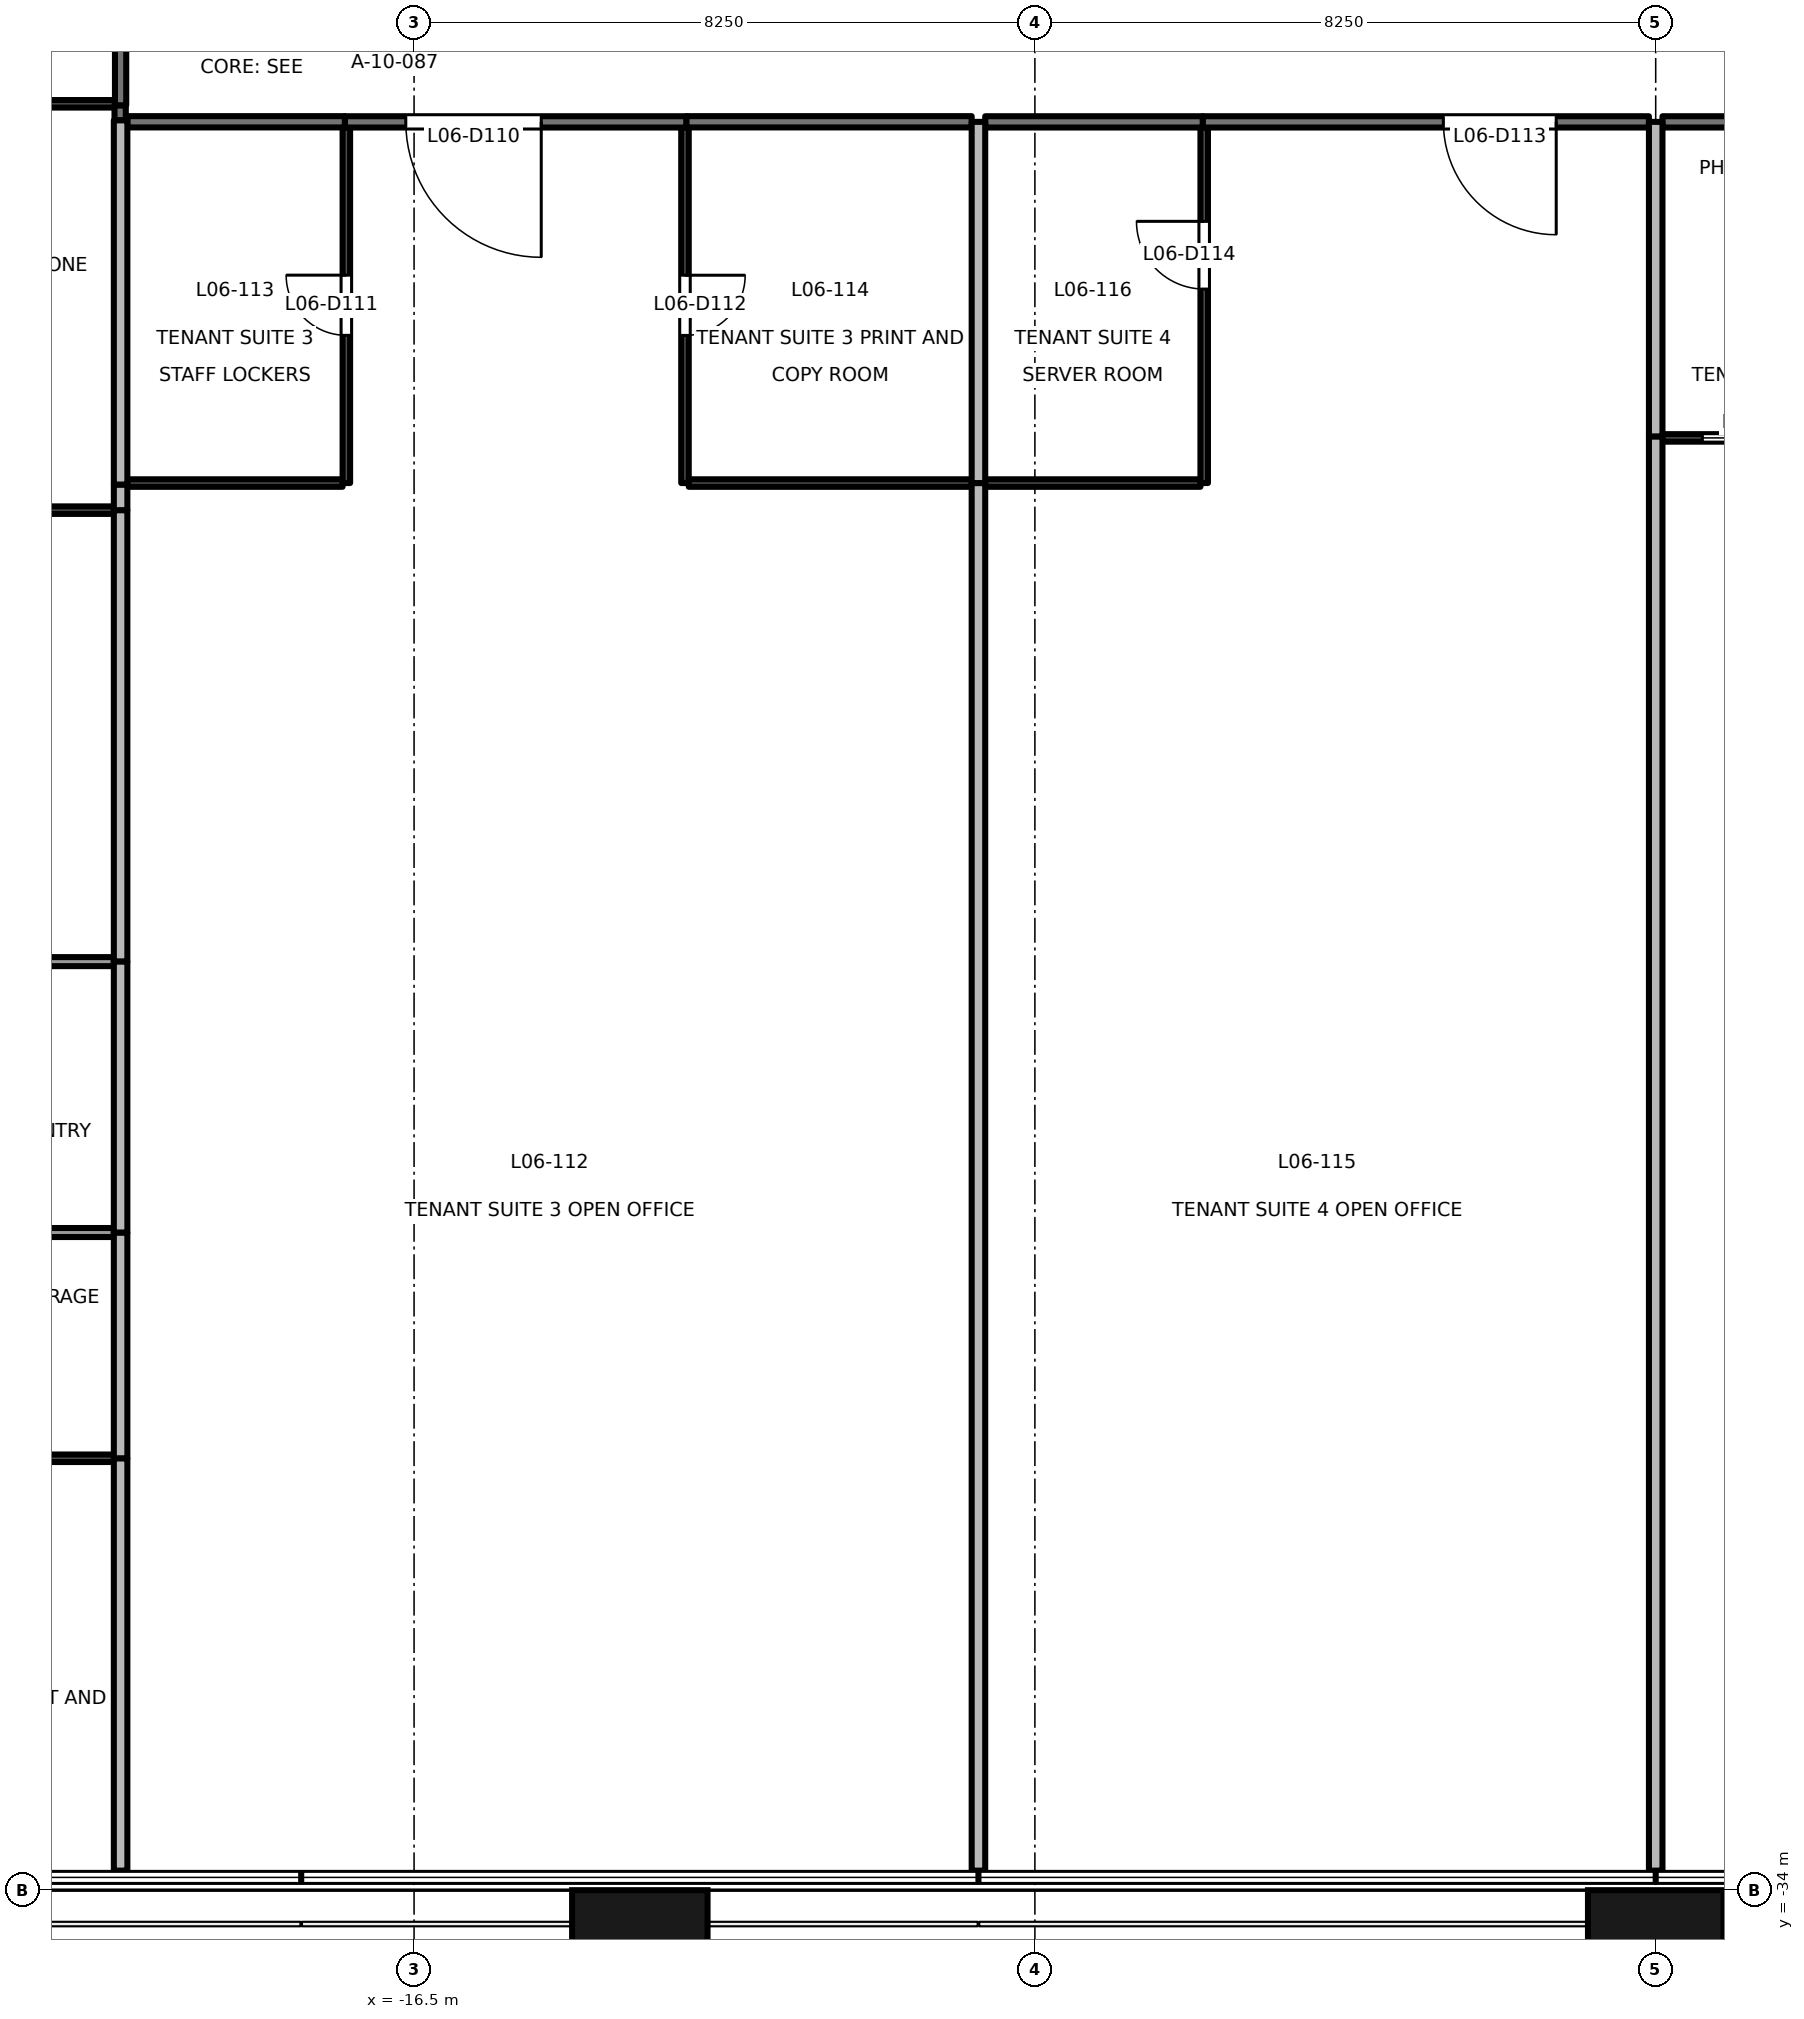
"""IFC4 building model, lengths in metres.
Left out: names, types, materials, properties, quantities, classifications, styles, units other than length and angle.
Written with IfcOpenShell. Run it as: python <this file> out.ifc"""

import sys

from ifc_helpers import new_model, si_unit, direction, frame, frame_2d, origin, origin_2d, place, context, subcontext, project, spatial, rectangle, extrude, element, fill, save


model = new_model("IFC4")
c1 = context("Model", 3, precision=1e-05, world=origin(), true_north=direction((0.0, 1.0)))
c2 = subcontext(c1, "Body", "Model", "MODEL_VIEW")
j1 = project(units=[si_unit("LENGTHUNIT", "METRE"), si_unit("PLANEANGLEUNIT", "RADIAN")], contexts=[c1])
p1 = place(None, origin())
s1 = spatial("IfcSite", under=j1, at=p1, CompositionType="ELEMENT")
p2 = place(p1, origin())
s2 = spatial("IfcBuilding", under=s1, at=p2, CompositionType="ELEMENT")
p3 = place(p2, frame((0.0, 0.0, 32.4)))
s3 = spatial("IfcBuildingStorey", under=s2, at=p3, CompositionType="ELEMENT", Elevation=32.4)
for number, where, z_axis, x_axis in (
    (1, (-13.5, -34.9, -0.2), (0.0, 0.0, 1.0), (1.0, 0.0, 0.0)),
    (2, (0.0, -34.9, -0.2), (0.0, 0.0, 1.0), (1.0, 0.0, 0.0)),
):
    element("IfcColumn", number, at=place(p3, frame(where, z_axis=z_axis, x_axis=x_axis)), inside=s3, PredefinedType="COLUMN", context=c2, shape_type="SweptSolid", body=[
        extrude(rectangle(XDim=1.8, YDim=1.8, at=origin_2d()), origin(), (0.0, 0.0, 1.0), 4.1),
    ])
p4 = place(p3, frame((-20.406, -10.48, 0.0), z_axis=(0.0, 0.0, 1.0), x_axis=(0.0, 1.0, 0.0)))
e3 = element("IfcWall", 3, at=p4, inside=s3, PredefinedType="PARTITIONING", context=c2, shape_type="SweptSolid", body=[
    extrude(rectangle(XDim=0.2, YDim=0.15, at=frame_2d((0.1, 0.0))), origin(), (0.0, 0.0, 1.0), 3.9),
])
p5 = place(p3, frame((-20.4, -10.28, 0.0), z_axis=(0.0, 0.0, 1.0), x_axis=(0.0, 1.0, 0.0)))
e4 = element("IfcWall", 4, at=p5, inside=s3, PredefinedType="PARTITIONING", context=c2, shape_type="SweptSolid", body=[
    extrude(rectangle(XDim=4.2, YDim=0.15, at=frame_2d((2.1, 0.0))), origin(), (0.0, 0.0, 1.0), 3.3),
])
p6 = place(p3, frame((-12.88, -10.5, 0.0), z_axis=(0.0, 0.0, 1.0), x_axis=(-1.0, 0.0, 0.0)))
e5 = element("IfcWall", 5, at=p6, inside=s3, PredefinedType="PARTITIONING", context=c2, shape_type="SweptSolid", body=[
    extrude(rectangle(XDim=4.54, YDim=0.15, at=frame_2d((2.27, 0.0))), origin(), (0.0, 0.0, 1.0), 2.9),
])
p7 = place(p6, frame((1.93, 0.0, 0.0)))
e6 = element("IfcOpeningElement", 6, at=p7, cuts=e5, PredefinedType="OPENING", context=c2, shape_type="SweptSolid", body=[
    extrude(rectangle(XDim=1.8, YDim=2.1, at=frame_2d((0.9, 1.05))), frame((0.0, 0.085, 0.0), z_axis=(0.0, -1.0, 0.0), x_axis=(1.0, 0.0, 0.0)), (0.0, 0.0, 1.0), 0.171),
])
p8 = place(p3, frame((-17.42, -10.499, 0.0), z_axis=(0.0, 0.0, 1.0), x_axis=(-1.0, 0.0, 0.0)))
e7 = element("IfcWall", 7, at=p8, inside=s3, PredefinedType="PARTITIONING", context=c2, shape_type="SweptSolid", body=[
    extrude(rectangle(XDim=2.89, YDim=0.15, at=frame_2d((1.445, 0.0))), origin(), (0.0, 0.0, 1.0), 2.5),
])
p9 = place(p3, frame((-9.09, -10.499, 0.0), z_axis=(0.0, 0.0, 1.0), x_axis=(-1.0, 0.0, 0.0)))
e8 = element("IfcWall", 8, at=p9, inside=s3, PredefinedType="PARTITIONING", context=c2, shape_type="SweptSolid", body=[
    extrude(rectangle(XDim=3.79, YDim=0.15, at=frame_2d((1.895, 0.0))), origin(), (0.0, 0.0, 1.0), 2.9),
])
p10 = place(p3, frame((-0.09, -10.5, 0.0), z_axis=(0.0, 0.0, 1.0), x_axis=(-1.0, 0.0, 0.0)))
e9 = element("IfcWall", 9, at=p10, inside=s3, PredefinedType="PARTITIONING", context=c2, shape_type="SweptSolid", body=[
    extrude(rectangle(XDim=5.93, YDim=0.15, at=frame_2d((2.965, 0.0))), origin(), (0.0, 0.0, 1.0), 2.9),
])
p11 = place(p10, frame((1.232, 0.0, 0.0)))
e10 = element("IfcOpeningElement", 10, at=p11, cuts=e9, PredefinedType="OPENING", context=c2, shape_type="SweptSolid", body=[
    extrude(rectangle(XDim=1.5, YDim=2.1, at=frame_2d((0.75, 1.05))), frame((0.0, 0.085, 0.0), z_axis=(0.0, -1.0, 0.0), x_axis=(1.0, 0.0, 0.0)), (0.0, 0.0, 1.0), 0.171),
])
for number, where, z_axis, x_axis in (
    (11, (-6.02, -10.5, 0.0), (0.0, 0.0, 1.0), (-1.0, 0.0, 0.0)),
    (12, (2.98, -10.5, 0.0), (0.0, 0.0, 1.0), (-1.0, 0.0, 0.0)),
):
    element("IfcWall", number, at=place(p3, frame(where, z_axis=z_axis, x_axis=x_axis)), inside=s3, PredefinedType="PARTITIONING", context=c2, shape_type="SweptSolid", body=[
        extrude(rectangle(XDim=2.89, YDim=0.15, at=frame_2d((1.445, 0.0))), origin(), (0.0, 0.0, 1.0), 2.9),
    ])
p12 = place(p3, frame((-20.49, -21.66, 0.0), z_axis=(0.0, 0.0, 1.0), x_axis=(-1.0, 0.0, 0.0)))
e13 = element("IfcWall", 13, at=p12, inside=s3, PredefinedType="PARTITIONING", context=c2, shape_type="SweptSolid", body=[
    extrude(rectangle(XDim=3.81, YDim=0.12, at=frame_2d((1.905, 0.0))), origin(), (0.0, 0.0, 1.0), 3.9),
])
p13 = place(p12, frame((1.937, 0.0, 0.0)))
e14 = element("IfcOpeningElement", 14, at=p13, cuts=e13, PredefinedType="OPENING", context=c2, shape_type="SweptSolid", body=[
    extrude(rectangle(XDim=0.9, YDim=2.1, at=frame_2d((0.45, 1.05))), frame((0.0, 0.071, 0.0), z_axis=(0.0, -1.0, 0.0), x_axis=(1.0, 0.0, 0.0)), (0.0, 0.0, 1.0), 0.141),
])
p14 = place(p3, frame((-24.25, -15.66, 0.0), z_axis=(0.0, 0.0, 1.0), x_axis=(1.0, 0.0, 0.0)))
e15 = element("IfcWall", 15, at=p14, inside=s3, PredefinedType="PARTITIONING", context=c2, shape_type="SweptSolid", body=[
    extrude(rectangle(XDim=3.76, YDim=0.1, at=frame_2d((1.88, 0.0))), origin(), (0.0, 0.0, 1.0), 3.9),
])
p15 = place(p14, frame((0.98, 0.0, 0.9)))
e16 = element("IfcOpeningElement", 16, at=p15, cuts=e15, PredefinedType="OPENING", context=c2, shape_type="SweptSolid", body=[
    extrude(rectangle(XDim=1.8, YDim=1.2, at=frame_2d((0.9, 0.6))), frame((0.0, 0.061, 0.0), z_axis=(0.0, -1.0, 0.0), x_axis=(1.0, 0.0, 0.0)), (0.0, 0.0, 1.0), 0.121),
])
p16 = place(p3, frame((-20.4, -15.66, 0.0), z_axis=(0.0, 0.0, 1.0), x_axis=(0.0, -1.0, 0.0)))
e17 = element("IfcWall", 17, at=p16, inside=s3, PredefinedType="PARTITIONING", context=c2, shape_type="SweptSolid", body=[
    extrude(rectangle(XDim=6.0, YDim=0.18, at=frame_2d((3.0, 0.0))), origin(), (0.0, 0.0, 1.0), 3.3),
])
p17 = place(p3, frame((-24.25, -28.26, 0.0), z_axis=(0.0, 0.0, 1.0), x_axis=(1.0, 0.0, 0.0)))
e18 = element("IfcWall", 18, at=p17, inside=s3, PredefinedType="PARTITIONING", context=c2, shape_type="SweptSolid", body=[
    extrude(rectangle(XDim=3.76, YDim=0.1, at=frame_2d((1.88, 0.0))), origin(), (0.0, 0.0, 1.0), 3.9),
])
p18 = place(p3, frame((-20.4, -28.26, 0.0), z_axis=(0.0, 0.0, 1.0), x_axis=(0.0, -1.0, 0.0)))
e19 = element("IfcWall", 19, at=p18, inside=s3, PredefinedType="PARTITIONING", context=c2, shape_type="SweptSolid", body=[
    extrude(rectangle(XDim=5.48, YDim=0.18, at=frame_2d((2.74, 0.0))), origin(), (0.0, 0.0, 1.0), 3.9),
])
p19 = place(p3, frame((-24.3, -25.26, 0.0), z_axis=(0.0, 0.0, 1.0), x_axis=(1.0, 0.0, 0.0)))
e20 = element("IfcWall", 20, at=p19, inside=s3, PredefinedType="PARTITIONING", context=c2, shape_type="SweptSolid", body=[
    extrude(rectangle(XDim=3.81, YDim=0.12, at=frame_2d((1.905, 0.0))), origin(), (0.0, 0.0, 1.0), 3.9),
])
p20 = place(p3, frame((-20.4, -25.26, 0.0), z_axis=(0.0, 0.0, 1.0), x_axis=(0.0, -1.0, 0.0)))
e21 = element("IfcWall", 21, at=p20, inside=s3, PredefinedType="PARTITIONING", context=c2, shape_type="SweptSolid", body=[
    extrude(rectangle(XDim=3.0, YDim=0.18, at=frame_2d((1.5, 0.0))), origin(), (0.0, 0.0, 1.0), 3.3),
])
p21 = place(p3, frame((-20.4, -21.66, 0.0), z_axis=(0.0, 0.0, 1.0), x_axis=(0.0, -1.0, 0.0)))
e22 = element("IfcWall", 22, at=p21, inside=s3, PredefinedType="PARTITIONING", context=c2, shape_type="SweptSolid", body=[
    extrude(rectangle(XDim=3.6, YDim=0.18, at=frame_2d((1.8, 0.0))), origin(), (0.0, 0.0, 1.0), 3.3),
])
p22 = place(p3, frame((-24.25, -10.26, 0.0), z_axis=(0.0, 0.0, 1.0), x_axis=(1.0, 0.0, 0.0)))
e23 = element("IfcWall", 23, at=p22, inside=s3, PredefinedType="PARTITIONING", context=c2, shape_type="SweptSolid", body=[
    extrude(rectangle(XDim=3.775, YDim=0.1, at=frame_2d((1.887, 0.0))), origin(), (0.0, 0.0, 1.0), 3.9),
])
p23 = place(p3, frame((-20.4, -15.32, 0.0), z_axis=(0.0, 0.0, 1.0), x_axis=(0.0, -1.0, 0.0)))
e24 = element("IfcWall", 24, at=p23, inside=s3, PredefinedType="PARTITIONING", context=c2, shape_type="SweptSolid", body=[
    extrude(rectangle(XDim=0.34, YDim=0.18, at=frame_2d((0.17, 0.0))), origin(), (0.0, 0.0, 1.0), 3.9),
])
p24 = place(p3, frame((-20.4, -10.48, 0.0), z_axis=(0.0, 0.0, 1.0), x_axis=(0.0, -1.0, 0.0)))
e25 = element("IfcWall", 25, at=p24, inside=s3, PredefinedType="PARTITIONING", context=c2, shape_type="SweptSolid", body=[
    extrude(rectangle(XDim=4.84, YDim=0.18, at=frame_2d((2.42, 0.0))), origin(), (0.0, 0.0, 1.0), 3.3),
])
p25 = place(p3, frame((-20.31, -15.3, 0.0), z_axis=(0.0, 0.0, 1.0), x_axis=(1.0, 0.0, 0.0)))
e26 = element("IfcWall", 26, at=p25, inside=s3, PredefinedType="PARTITIONING", context=c2, shape_type="SweptSolid", body=[
    extrude(rectangle(XDim=2.86, YDim=0.1, at=frame_2d((1.43, 0.0))), origin(), (0.0, 0.0, 1.0), 2.5),
])
p26 = place(p3, frame((-17.4, -15.3, 0.0), z_axis=(0.0, 0.0, 1.0), x_axis=(0.0, 1.0, 0.0)))
e27 = element("IfcWall", 27, at=p26, inside=s3, PredefinedType="PARTITIONING", context=c2, shape_type="SweptSolid", body=[
    extrude(rectangle(XDim=4.725, YDim=0.1, at=frame_2d((2.363, 0.0))), origin(), (0.0, 0.0, 1.0), 3.9),
])
p27 = place(p26, frame((1.963, 0.0, 0.0)))
e28 = element("IfcOpeningElement", 28, at=p27, cuts=e27, PredefinedType="OPENING", context=c2, shape_type="SweptSolid", body=[
    extrude(rectangle(XDim=0.8, YDim=2.1, at=frame_2d((0.4, 1.05))), frame((0.0, 0.061, 0.0), z_axis=(0.0, -1.0, 0.0), x_axis=(1.0, 0.0, 0.0)), (0.0, 0.0, 1.0), 0.121),
])
p28 = place(p3, frame((-12.9, -10.575, 0.0), z_axis=(0.0, 0.0, 1.0), x_axis=(0.0, -1.0, 0.0)))
e29 = element("IfcWall", 29, at=p28, inside=s3, PredefinedType="PARTITIONING", context=c2, shape_type="SweptSolid", body=[
    extrude(rectangle(XDim=4.725, YDim=0.1, at=frame_2d((2.363, 0.0))), origin(), (0.0, 0.0, 1.0), 3.9),
])
p29 = place(p28, frame((1.963, 0.0, 0.0)))
e30 = element("IfcOpeningElement", 30, at=p29, cuts=e29, PredefinedType="OPENING", context=c2, shape_type="SweptSolid", body=[
    extrude(rectangle(XDim=0.8, YDim=2.1, at=frame_2d((0.4, 1.05))), frame((0.0, 0.061, 0.0), z_axis=(0.0, -1.0, 0.0), x_axis=(1.0, 0.0, 0.0)), (0.0, 0.0, 1.0), 0.121),
])
p30 = place(p3, frame((-12.85, -15.3, 0.0), z_axis=(0.0, 0.0, 1.0), x_axis=(1.0, 0.0, 0.0)))
e31 = element("IfcWall", 31, at=p30, inside=s3, PredefinedType="PARTITIONING", context=c2, shape_type="SweptSolid", body=[
    extrude(rectangle(XDim=3.76, YDim=0.1, at=frame_2d((1.88, 0.0))), origin(), (0.0, 0.0, 1.0), 2.9),
])
p31 = place(p3, frame((-9.0, -15.3, 0.0), z_axis=(0.0, 0.0, 1.0), x_axis=(0.0, -1.0, 0.0)))
e32 = element("IfcWall", 32, at=p31, inside=s3, PredefinedType="PARTITIONING", context=c2, shape_type="SweptSolid", body=[
    extrude(rectangle(XDim=18.44, YDim=0.18, at=frame_2d((9.22, 0.0))), origin(), (0.0, 0.0, 1.0), 2.9),
])
p32 = place(p3, frame((-9.0, -10.5, 0.0), z_axis=(0.0, 0.0, 1.0), x_axis=(0.0, -1.0, 0.0)))
e33 = element("IfcWall", 33, at=p32, inside=s3, PredefinedType="PARTITIONING", context=c2, shape_type="SweptSolid", body=[
    extrude(rectangle(XDim=4.8, YDim=0.18, at=frame_2d((2.4, 0.0))), origin(), (0.0, 0.0, 1.0), 2.9),
])
p33 = place(p3, frame((-8.91, -15.3, 0.0), z_axis=(0.0, 0.0, 1.0), x_axis=(1.0, 0.0, 0.0)))
e34 = element("IfcWall", 34, at=p33, inside=s3, PredefinedType="PARTITIONING", context=c2, shape_type="SweptSolid", body=[
    extrude(rectangle(XDim=2.86, YDim=0.1, at=frame_2d((1.43, 0.0))), origin(), (0.0, 0.0, 1.0), 2.9),
])
p34 = place(p3, frame((-6.0, -15.3, 0.0), z_axis=(0.0, 0.0, 1.0), x_axis=(0.0, 1.0, 0.0)))
e35 = element("IfcWall", 35, at=p34, inside=s3, PredefinedType="PARTITIONING", context=c2, shape_type="SweptSolid", body=[
    extrude(rectangle(XDim=4.725, YDim=0.1, at=frame_2d((2.363, 0.0))), origin(), (0.0, 0.0, 1.0), 3.9),
])
p35 = place(p34, frame((2.578, 0.0, 0.0)))
e36 = element("IfcOpeningElement", 36, at=p35, cuts=e35, PredefinedType="OPENING", context=c2, shape_type="SweptSolid", body=[
    extrude(rectangle(XDim=0.9, YDim=2.1, at=frame_2d((0.45, 1.05))), frame((0.0, 0.061, 0.0), z_axis=(0.0, -1.0, 0.0), x_axis=(1.0, 0.0, 0.0)), (0.0, 0.0, 1.0), 0.121),
])
p36 = place(p3, frame((0.0, -14.68, 0.0), z_axis=(0.0, 0.0, 1.0), x_axis=(0.0, -1.0, 0.0)))
e37 = element("IfcWall", 37, at=p36, inside=s3, PredefinedType="PARTITIONING", context=c2, shape_type="SweptSolid", body=[
    extrude(rectangle(XDim=19.06, YDim=0.18, at=frame_2d((9.53, 0.0))), origin(), (0.0, 0.0, 1.0), 2.9),
])
p37 = place(p3, frame((0.0, -10.5, 0.0), z_axis=(0.0, 0.0, 1.0), x_axis=(0.0, -1.0, 0.0)))
e38 = element("IfcWall", 38, at=p37, inside=s3, PredefinedType="PARTITIONING", context=c2, shape_type="SweptSolid", body=[
    extrude(rectangle(XDim=4.18, YDim=0.18, at=frame_2d((2.09, 0.0))), origin(), (0.0, 0.0, 1.0), 2.9),
])
p38 = place(p3, frame((0.09, -14.7, 0.0), z_axis=(0.0, 0.0, 1.0), x_axis=(1.0, 0.0, 0.0)))
e39 = element("IfcWall", 39, at=p38, inside=s3, PredefinedType="PARTITIONING", context=c2, shape_type="SweptSolid", body=[
    extrude(rectangle(XDim=2.86, YDim=0.1, at=frame_2d((1.43, 0.0))), origin(), (0.0, 0.0, 1.0), 2.9),
])
p39 = place(p38, frame((0.53, 0.0, 0.9)))
e40 = element("IfcOpeningElement", 40, at=p39, cuts=e39, PredefinedType="OPENING", context=c2, shape_type="SweptSolid", body=[
    extrude(rectangle(XDim=1.8, YDim=1.2, at=frame_2d((0.9, 0.6))), frame((0.0, 0.061, 0.0), z_axis=(0.0, -1.0, 0.0), x_axis=(1.0, 0.0, 0.0)), (0.0, 0.0, 1.0), 0.121),
])
p40 = place(p7, origin())
e41 = element("IfcDoor", 41, at=p40, inside=s3, OperationType="DOUBLE_DOOR_SINGLE_SWING", PredefinedType="DOOR", context=c2, shape_type="SweptSolid", body=[
    extrude(rectangle(XDim=1.8, YDim=2.1, at=frame_2d((0.9, 1.05))), frame((0.0, 0.025, 0.0), z_axis=(0.0, -1.0, 0.0), x_axis=(1.0, 0.0, 0.0)), (0.0, 0.0, 1.0), 0.05),
])
fill(e6, e41)
p41 = place(p27, origin())
e42 = element("IfcDoor", 42, at=p41, inside=s3, OperationType="SINGLE_SWING_RIGHT", PredefinedType="DOOR", context=c2, shape_type="SweptSolid", body=[
    extrude(rectangle(XDim=0.8, YDim=2.1, at=frame_2d((0.4, 1.05))), frame((0.0, 0.025, 0.0), z_axis=(0.0, -1.0, 0.0), x_axis=(1.0, 0.0, 0.0)), (0.0, 0.0, 1.0), 0.05),
])
fill(e28, e42)
p42 = place(p29, origin())
e43 = element("IfcDoor", 43, at=p42, inside=s3, OperationType="SINGLE_SWING_LEFT", PredefinedType="DOOR", context=c2, shape_type="SweptSolid", body=[
    extrude(rectangle(XDim=0.8, YDim=2.1, at=frame_2d((0.4, 1.05))), frame((0.0, 0.025, 0.0), z_axis=(0.0, -1.0, 0.0), x_axis=(1.0, 0.0, 0.0)), (0.0, 0.0, 1.0), 0.05),
])
fill(e30, e43)
p43 = place(p11, origin())
e44 = element("IfcDoor", 44, at=p43, inside=s3, OperationType="DOUBLE_DOOR_SINGLE_SWING", PredefinedType="DOOR", context=c2, shape_type="SweptSolid", body=[
    extrude(rectangle(XDim=1.5, YDim=2.1, at=frame_2d((0.75, 1.05))), frame((0.0, 0.025, 0.0), z_axis=(0.0, -1.0, 0.0), x_axis=(1.0, 0.0, 0.0)), (0.0, 0.0, 1.0), 0.05),
])
fill(e10, e44)
p44 = place(p35, origin())
e45 = element("IfcDoor", 45, at=p44, inside=s3, OperationType="SINGLE_SWING_RIGHT", PredefinedType="DOOR", context=c2, shape_type="SweptSolid", body=[
    extrude(rectangle(XDim=0.9, YDim=2.1, at=frame_2d((0.45, 1.05))), frame((0.0, 0.025, 0.0), z_axis=(0.0, -1.0, 0.0), x_axis=(1.0, 0.0, 0.0)), (0.0, 0.0, 1.0), 0.05),
])
fill(e36, e45)
p45 = place(p39, origin())
e46 = element("IfcWindow", 46, at=p45, inside=s3, PartitioningType="SINGLE_PANEL", PredefinedType="WINDOW", context=c2, shape_type="SweptSolid", body=[
    extrude(rectangle(XDim=1.8, YDim=1.2, at=frame_2d((0.9, 0.6))), frame((0.0, 0.03, 0.0), z_axis=(0.0, -1.0, 0.0), x_axis=(1.0, 0.0, 0.0)), (0.0, 0.0, 1.0), 0.06),
])
fill(e40, e46)
save(model, sys.argv[1])
